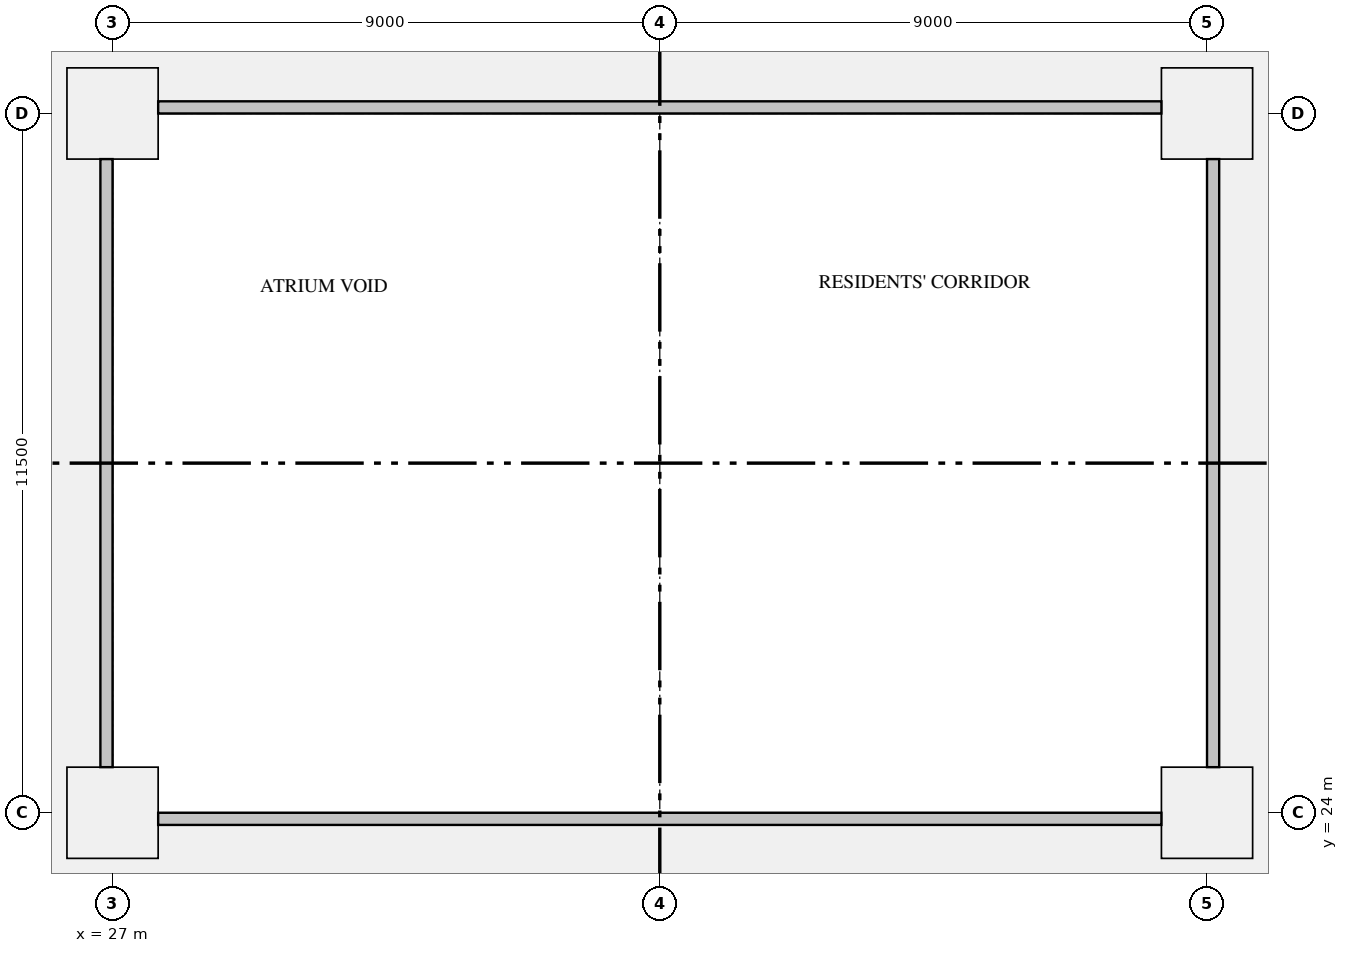
"""IFC4 building model, lengths in metres.
Left out: names, types, materials, properties, quantities, classifications, styles, units other than length and angle.
Written with IfcOpenShell. Run it as: python <this file> out.ifc"""

import sys

from ifc_helpers import new_model, si_unit, direction, frame, origin, origin_2d, place, context, subcontext, project, spatial, rectangle, extrude, element, save


model = new_model("IFC4")
c1 = context("Model", 3, precision=1e-05, world=origin(), true_north=direction((0.0, 1.0)))
c2 = subcontext(c1, "Body", "Model", "MODEL_VIEW")
j1 = project(units=[si_unit("LENGTHUNIT", "METRE"), si_unit("PLANEANGLEUNIT", "RADIAN")], contexts=[c1])
p1 = place(None, origin())
s1 = spatial("IfcSite", under=j1, at=p1, CompositionType="ELEMENT")
p2 = place(p1, origin())
s2 = spatial("IfcBuilding", under=s1, at=p2, CompositionType="ELEMENT")
p3 = place(p2, frame((0.0, 0.0, 19.5)))
s3 = spatial("IfcBuildingStorey", under=s2, at=p3, CompositionType="ELEMENT", Elevation=19.5)
for number, where, z_axis, x_axis in (
    (1, (27.0, 24.0, 0.0), (0.0, 0.0, 1.0), (1.0, 0.0, 0.0)),
    (2, (45.0, 24.0, 0.0), (0.0, 0.0, 1.0), (1.0, 0.0, 0.0)),
    (3, (27.0, 35.5, 0.0), (0.0, 0.0, 1.0), (1.0, 0.0, 0.0)),
    (4, (45.0, 35.5, 0.0), (0.0, 0.0, 1.0), (1.0, 0.0, 0.0)),
):
    element("IfcColumn", number, at=place(p3, frame(where, z_axis=z_axis, x_axis=x_axis)), inside=s3, PredefinedType="COLUMN", context=c2, shape_type="SweptSolid", body=[
        extrude(rectangle(XDim=1.5, YDim=1.5, at=origin_2d()), origin(), (0.0, 0.0, 1.0), 3.15),
    ])
save(model, sys.argv[1])
